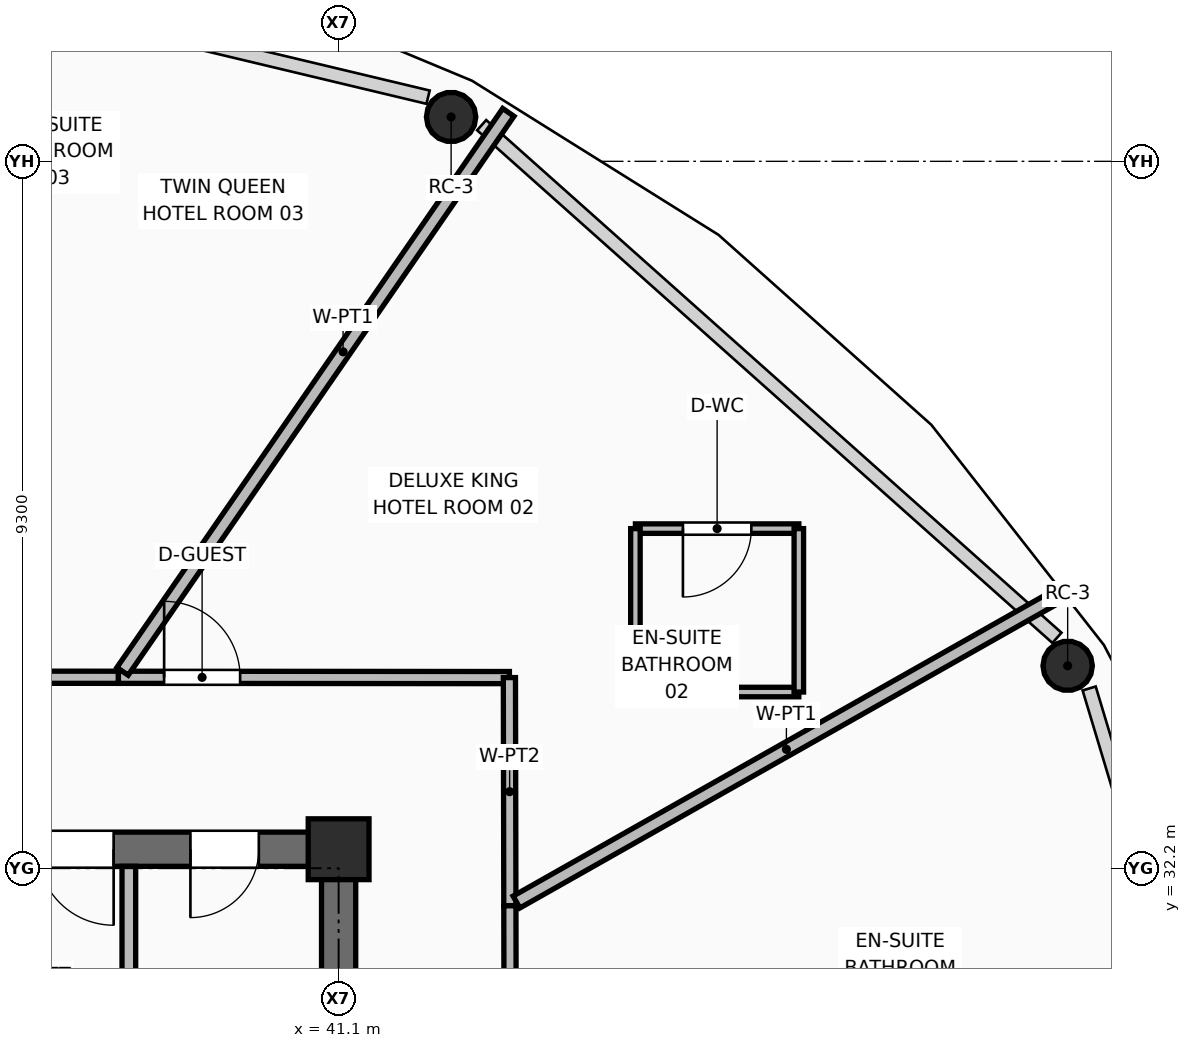
"""IFC4 building model, lengths in metres.
Left out: names, types, materials, properties, quantities, classifications, styles, units other than length and angle.
Written with IfcOpenShell. Run it as: python <this file> out.ifc"""

import sys

from ifc_helpers import new_model, si_unit, direction, frame, frame_2d, origin, origin_2d, place, context, subcontext, project, spatial, rectangle, hollow_circle, extrude, element, fill, save


model = new_model("IFC4")
c1 = context("Model", 3, precision=1e-05, world=origin(), true_north=direction((0.0, 1.0)))
c2 = subcontext(c1, "Body", "Model", "MODEL_VIEW")
j1 = project(units=[si_unit("LENGTHUNIT", "METRE"), si_unit("PLANEANGLEUNIT", "RADIAN")], contexts=[c1])
p1 = place(None, origin())
s1 = spatial("IfcSite", under=j1, at=p1, CompositionType="ELEMENT")
p2 = place(p1, origin())
s2 = spatial("IfcBuilding", under=s1, at=p2, CompositionType="ELEMENT")
p3 = place(p2, frame((0.0, 0.0, 212.4)))
s3 = spatial("IfcBuildingStorey", under=s2, at=p3, CompositionType="ELEMENT", Elevation=212.4)
p4 = place(p3, frame((41.1, 32.45, 0.0), z_axis=(0.0, 0.0, 1.0), x_axis=(1.0, 0.0, 0.0)))
e1 = element("IfcColumn", 1, at=p4, inside=s3, PredefinedType="COLUMN", context=c2, shape_type="SweptSolid", body=[
    extrude(rectangle(XDim=0.8, YDim=0.8, at=origin_2d()), origin(), (0.0, 0.0, 1.0), 3.75),
])
for number, where, z_axis, x_axis in (
    (2, (50.692, 34.863, 0.0), (-0.018, -0.009, 1.0), (0.458, -0.889, 0.0)),
    (3, (42.58, 42.084, 0.0), (-0.01, -0.016, 1.0), (0.844, -0.536, 0.0)),
):
    element("IfcColumn", number, at=place(p3, frame(where, z_axis=z_axis, x_axis=x_axis)), inside=s3, PredefinedType="COLUMN", context=c2, shape_type="SweptSolid", body=[
        extrude(hollow_circle(Radius=0.325, WallThickness=0.03, at=origin_2d()), origin(), (0.0, 0.0, 1.0), 3.571),
    ])
p5 = place(p3, frame((21.675, 32.45, 0.0), z_axis=(0.0, 0.0, 1.0), x_axis=(1.0, 0.0, 0.0)))
e4 = element("IfcWall", 4, at=p5, inside=s3, PredefinedType="SHEAR", context=c2, shape_type="SweptSolid", body=[
    extrude(rectangle(XDim=19.65, YDim=0.45, at=frame_2d((9.825, 0.0))), origin(), (0.0, 0.0, 1.0), 3.57),
])
p6 = place(p5, frame((2.075, 0.0, 0.0)))
e5 = element("IfcOpeningElement", 5, at=p6, cuts=e4, PredefinedType="OPENING", context=c2, shape_type="SweptSolid", body=[
    extrude(rectangle(XDim=1.1, YDim=2.1, at=frame_2d((0.55, 1.05))), frame((0.0, 0.235, 0.0), z_axis=(0.0, -1.0, 0.0), x_axis=(1.0, 0.0, 0.0)), (0.0, 0.0, 1.0), 0.47),
])
p7 = place(p5, frame((15.465, 0.0, 0.0)))
e6 = element("IfcOpeningElement", 6, at=p7, cuts=e4, PredefinedType="OPENING", context=c2, shape_type="SweptSolid", body=[
    extrude(rectangle(XDim=1.0, YDim=2.1, at=frame_2d((0.5, 1.05))), frame((0.0, 0.235, 0.0), z_axis=(0.0, -1.0, 0.0), x_axis=(1.0, 0.0, 0.0)), (0.0, 0.0, 1.0), 0.47),
])
p8 = place(p5, frame((17.475, 0.0, 0.0)))
e7 = element("IfcOpeningElement", 7, at=p8, cuts=e4, PredefinedType="OPENING", context=c2, shape_type="SweptSolid", body=[
    extrude(rectangle(XDim=0.9, YDim=2.1, at=frame_2d((0.45, 1.05))), frame((0.0, 0.235, 0.0), z_axis=(0.0, -1.0, 0.0), x_axis=(1.0, 0.0, 0.0)), (0.0, 0.0, 1.0), 0.47),
])
p9 = place(p3, frame((41.1, 18.025, 0.0), z_axis=(0.0, 0.0, 1.0), x_axis=(0.0, 1.0, 0.0)))
e8 = element("IfcWall", 8, at=p9, inside=s3, PredefinedType="SHEAR", context=c2, shape_type="SweptSolid", body=[
    extrude(rectangle(XDim=14.2, YDim=0.45, at=frame_2d((7.1, 0.0))), origin(), (0.0, 0.0, 1.0), 3.57),
])
p10 = place(p9, frame((3.435, 0.0, 0.0)))
e9 = element("IfcOpeningElement", 9, at=p10, cuts=e8, PredefinedType="OPENING", context=c2, shape_type="SweptSolid", body=[
    extrude(rectangle(XDim=1.05, YDim=2.1, at=frame_2d((0.525, 1.05))), frame((0.0, 0.235, 0.0), z_axis=(0.0, -1.0, 0.0), x_axis=(1.0, 0.0, 0.0)), (0.0, 0.0, 1.0), 0.47),
])
p11 = place(p3, frame((38.34, 28.62, 0.0), z_axis=(0.0, 0.0, 1.0), x_axis=(0.0, 1.0, 0.0)))
e10 = element("IfcWall", 10, at=p11, inside=s3, PredefinedType="PARTITIONING", context=c2, shape_type="SweptSolid", body=[
    extrude(rectangle(XDim=3.605, YDim=0.18, at=frame_2d((1.802, 0.0))), origin(), (0.0, 0.0, 1.0), 3.55),
])
p12 = place(p3, frame((32.74, 34.715, 0.0), z_axis=(0.0, 0.0, 1.0), x_axis=(0.999999831231, -0.000580979523, 0.0)))
e11 = element("IfcWall", 11, at=p12, inside=s3, PredefinedType="PARTITIONING", context=c2, shape_type="SweptSolid", body=[
    extrude(rectangle(XDim=5.463, YDim=0.16, at=frame_2d((2.731, 0.0))), origin(), (0.0, 0.0, 1.0), 3.55),
])
p13 = place(p12, frame((0.16, 0.0, 0.0)))
e12 = element("IfcOpeningElement", 12, at=p13, cuts=e11, PredefinedType="OPENING", context=c2, shape_type="SweptSolid", body=[
    extrude(rectangle(XDim=1.0, YDim=2.1, at=frame_2d((0.5, 1.05))), frame((0.0, 0.09, 0.0), z_axis=(0.0, -1.0, 0.0), x_axis=(1.0, 0.0, 0.0)), (0.0, 0.0, 1.0), 0.18),
])
p14 = place(p3, frame((38.203, 34.712, 0.0), z_axis=(0.0, 0.0, 1.0), x_axis=(0.999999711676, -0.000759373298, 0.0)))
e13 = element("IfcWall", 13, at=p14, inside=s3, PredefinedType="PARTITIONING", context=c2, shape_type="SweptSolid", body=[
    extrude(rectangle(XDim=5.144, YDim=0.16, at=frame_2d((2.572, 0.0))), origin(), (0.0, 0.0, 1.0), 3.081),
])
p15 = place(p14, frame((0.601, 0.0, 0.0)))
e14 = element("IfcOpeningElement", 14, at=p15, cuts=e13, PredefinedType="OPENING", context=c2, shape_type="SweptSolid", body=[
    extrude(rectangle(XDim=1.0, YDim=2.1, at=frame_2d((0.5, 1.05))), frame((0.0, 0.09, 0.0), z_axis=(0.0, -1.0, 0.0), x_axis=(1.0, 0.0, 0.0)), (0.0, 0.0, 1.0), 0.18),
])
p16 = place(p3, frame((43.347, 34.708, 0.0), z_axis=(0.0, 0.0, 1.0), x_axis=(0.00203317732, -0.999997933093, 0.0)))
e15 = element("IfcWall", 15, at=p16, inside=s3, PredefinedType="PARTITIONING", context=c2, shape_type="SweptSolid", body=[
    extrude(rectangle(XDim=3.002, YDim=0.16, at=frame_2d((1.501, 0.0))), origin(), (0.0, 0.0, 1.0), 3.081),
])
p17 = place(p3, frame((43.353, 31.706, 0.0), z_axis=(0.0, 0.0, 1.0), x_axis=(0.002074684332, -0.99999784784, 0.0)))
e16 = element("IfcWall", 16, at=p17, inside=s3, PredefinedType="PARTITIONING", context=c2, shape_type="SweptSolid", body=[
    extrude(rectangle(XDim=5.766, YDim=0.16, at=frame_2d((2.883, 0.0))), origin(), (0.0, 0.0, 1.0), 3.55),
])
p18 = place(p17, frame((2.235, 0.0, 0.0)))
e17 = element("IfcOpeningElement", 17, at=p18, cuts=e16, PredefinedType="OPENING", context=c2, shape_type="SweptSolid", body=[
    extrude(rectangle(XDim=1.0, YDim=2.1, at=frame_2d((0.5, 1.05))), frame((0.0, 0.09, 0.0), z_axis=(0.0, -1.0, 0.0), x_axis=(1.0, 0.0, 0.0)), (0.0, 0.0, 1.0), 0.18),
])
p19 = place(p3, frame((43.44, 31.755, 0.0), z_axis=(0.0, 0.0, 1.0), x_axis=(0.870388943292, 0.492364790978, 0.0)))
e18 = element("IfcWall", 18, at=p19, inside=s3, PredefinedType="PARTITIONING", context=c2, shape_type="SweptSolid", body=[
    extrude(rectangle(XDim=8.161, YDim=0.18, at=frame_2d((4.08, 0.0))), origin(), (0.0, 0.0, 1.0), 2.925),
])
p20 = place(p3, frame((38.257, 34.79, 0.0), z_axis=(0.0, 0.0, 1.0), x_axis=(0.568051508393, 0.822993003502, 0.0)))
e19 = element("IfcWall", 19, at=p20, inside=s3, PredefinedType="PARTITIONING", context=c2, shape_type="SweptSolid", body=[
    extrude(rectangle(XDim=8.936, YDim=0.18, at=frame_2d((4.468, 0.0))), origin(), (0.0, 0.0, 1.0), 2.925),
])
p21 = place(p3, frame((45.005, 34.518, 0.0), z_axis=(0.0, 0.0, 1.0), x_axis=(1.0, 0.0, 0.0)))
e20 = element("IfcWall", 20, at=p21, inside=s3, PredefinedType="PARTITIONING", context=c2, shape_type="SweptSolid", body=[
    extrude(rectangle(XDim=2.15, YDim=0.125, at=frame_2d((1.075, 0.0))), origin(), (0.0, 0.0, 1.0), 3.55),
])
p22 = place(p3, frame((45.005, 36.668, 0.0), z_axis=(0.0, 0.0, 1.0), x_axis=(1.0, 0.0, 0.0)))
e21 = element("IfcWall", 21, at=p22, inside=s3, PredefinedType="PARTITIONING", context=c2, shape_type="SweptSolid", body=[
    extrude(rectangle(XDim=2.15, YDim=0.125, at=frame_2d((1.075, 0.0))), origin(), (0.0, 0.0, 1.0), 3.55),
])
p23 = place(p22, frame((0.625, 0.0, 0.0)))
e22 = element("IfcOpeningElement", 22, at=p23, cuts=e21, PredefinedType="OPENING", context=c2, shape_type="SweptSolid", body=[
    extrude(rectangle(XDim=0.9, YDim=2.1, at=frame_2d((0.45, 1.05))), frame((0.0, 0.073, 0.0), z_axis=(0.0, -1.0, 0.0), x_axis=(1.0, 0.0, 0.0)), (0.0, 0.0, 1.0), 0.145),
])
for number, where, z_axis, x_axis in (
    (23, (45.005, 34.518, 0.0), (0.0, 0.0, 1.0), (0.0, 1.0, 0.0)),
    (24, (47.155, 34.518, 0.0), (0.0, 0.0, 1.0), (0.0, 1.0, 0.0)),
):
    element("IfcWall", number, at=place(p3, frame(where, z_axis=z_axis, x_axis=x_axis)), inside=s3, PredefinedType="PARTITIONING", context=c2, shape_type="SweptSolid", body=[
        extrude(rectangle(XDim=2.15, YDim=0.125, at=frame_2d((1.075, 0.0))), origin(), (0.0, 0.0, 1.0), 3.55),
    ])
p24 = place(p7, frame((1.0, 0.0, 0.0), z_axis=(0.0, 0.0, 1.0), x_axis=(-1.0, 0.0, 0.0)))
e25 = element("IfcDoor", 25, at=p24, inside=s3, OperationType="SINGLE_SWING_LEFT", PredefinedType="DOOR", context=c2, shape_type="SweptSolid", body=[
    extrude(rectangle(XDim=1.0, YDim=2.1, at=frame_2d((0.5, 1.05))), frame((0.0, 0.025, 0.0), z_axis=(0.0, -1.0, 0.0), x_axis=(1.0, 0.0, 0.0)), (0.0, 0.0, 1.0), 0.05),
])
fill(e6, e25)
p25 = place(p8, frame((0.9, 0.0, 0.0), z_axis=(0.0, 0.0, 1.0), x_axis=(-1.0, 0.0, 0.0)))
e26 = element("IfcDoor", 26, at=p25, inside=s3, OperationType="SINGLE_SWING_RIGHT", PredefinedType="DOOR", context=c2, shape_type="SweptSolid", body=[
    extrude(rectangle(XDim=0.9, YDim=2.1, at=frame_2d((0.45, 1.05))), frame((0.0, 0.025, 0.0), z_axis=(0.0, -1.0, 0.0), x_axis=(1.0, 0.0, 0.0)), (0.0, 0.0, 1.0), 0.05),
])
fill(e7, e26)
p26 = place(p23, frame((0.9, 0.0, 0.0), z_axis=(0.0, 0.0, 1.0), x_axis=(-1.0, 0.0, 0.0)))
e27 = element("IfcDoor", 27, at=p26, inside=s3, OperationType="SINGLE_SWING_RIGHT", PredefinedType="DOOR", context=c2, shape_type="SweptSolid", body=[
    extrude(rectangle(XDim=0.9, YDim=2.1, at=frame_2d((0.45, 1.05))), frame((0.0, 0.025, 0.0), z_axis=(0.0, -1.0, 0.0), x_axis=(1.0, 0.0, 0.0)), (0.0, 0.0, 1.0), 0.05),
])
fill(e22, e27)
p27 = place(p15, origin())
e28 = element("IfcDoor", 28, at=p27, inside=s3, OperationType="SINGLE_SWING_LEFT", PredefinedType="DOOR", context=c2, shape_type="SweptSolid", body=[
    extrude(rectangle(XDim=1.0, YDim=2.1, at=frame_2d((0.5, 1.05))), frame((0.0, 0.025, 0.0), z_axis=(0.0, -1.0, 0.0), x_axis=(1.0, 0.0, 0.0)), (0.0, 0.0, 1.0), 0.05),
])
fill(e14, e28)
save(model, sys.argv[1])
